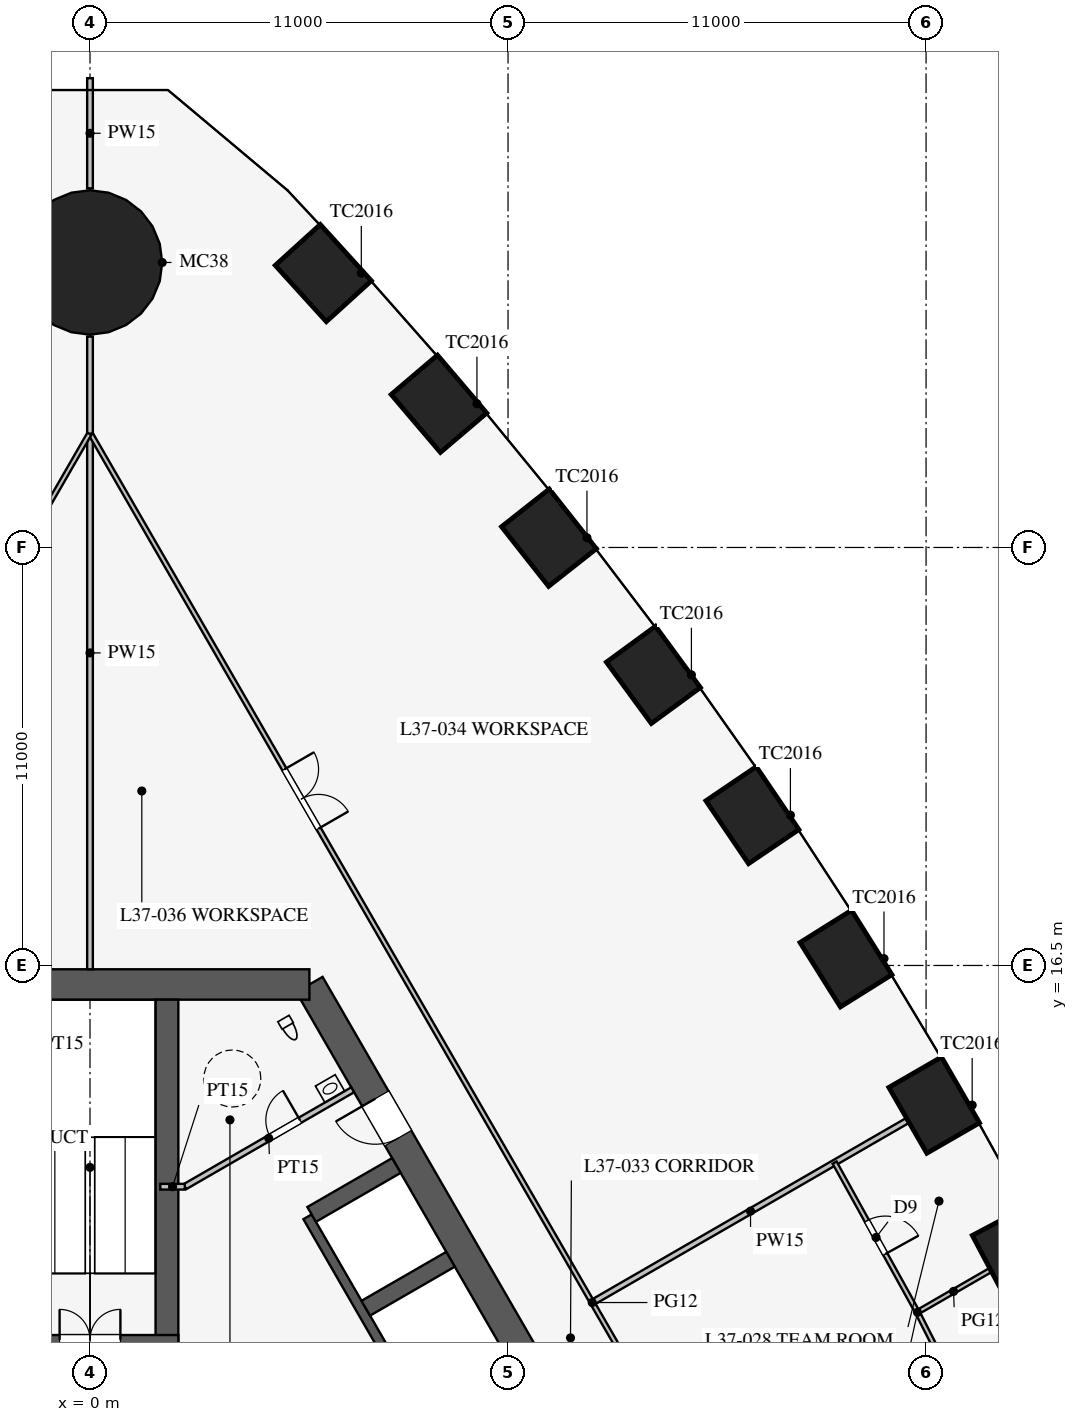
"""IFC4 building model, lengths in metres.
Left out: names, types, materials, properties, quantities, classifications, styles, units other than length and angle.
Written with IfcOpenShell. Run it as: python <this file> out.ifc"""

import sys

from ifc_helpers import new_model, si_unit, direction, frame, frame_2d, origin, origin_2d, place, context, subcontext, project, spatial, rectangle, circle, extrude, element, fill, save


model = new_model("IFC4")
c1 = context("Model", 3, precision=1e-05, world=origin(), true_north=direction((0.0, 1.0)))
c2 = subcontext(c1, "Body", "Model", "MODEL_VIEW")
j1 = project(units=[si_unit("LENGTHUNIT", "METRE"), si_unit("PLANEANGLEUNIT", "RADIAN")], contexts=[c1])
p1 = place(None, origin())
s1 = spatial("IfcSite", under=j1, at=p1, CompositionType="ELEMENT")
p2 = place(p1, origin())
s2 = spatial("IfcBuilding", under=s1, at=p2, CompositionType="ELEMENT")
p3 = place(p2, frame((0.0, 0.0, 161.9)))
s3 = spatial("IfcBuildingStorey", under=s2, at=p3, CompositionType="ELEMENT", Elevation=161.9)
for number, where, z_axis, x_axis in (
    (1, (24.393, 8.887, 0.0), (0.0, 0.0, 1.0), (-0.468, 0.883, 0.0)),
    (2, (22.213, 12.825, 0.0), (0.0, 0.0, 1.0), (-0.5, 0.866, 0.0)),
    (3, (19.893, 16.681, 0.0), (0.0, 0.0, 1.0), (-0.531, 0.847, 0.0)),
    (4, (17.43, 20.456, 0.0), (0.0, 0.0, 1.0), (-0.561, 0.828, 0.0)),
    (5, (14.825, 24.148, 0.0), (0.0, 0.0, 1.0), (-0.591, 0.807, 0.0)),
    (6, (12.077, 27.757, 0.0), (0.0, 0.0, 1.0), (-0.62, 0.785, 0.0)),
    (7, (9.182, 31.282, 0.0), (0.0, 0.0, 1.0), (-0.648, 0.762, 0.0)),
    (8, (6.139, 34.721, 0.0), (0.0, 0.0, 1.0), (-0.672, 0.74, 0.0)),
):
    element("IfcColumn", number, at=place(p3, frame(where, z_axis=z_axis, x_axis=x_axis)), inside=s3, PredefinedType="COLUMN", context=c2, shape_type="SweptSolid", body=[
        extrude(rectangle(XDim=2.0, YDim=1.6, at=origin_2d()), origin(), (0.0, 0.0, 1.0), 4.2),
    ])
p4 = place(p3, frame((0.0, 35.0, 0.0), z_axis=(0.0, 0.0, 1.0), x_axis=(1.0, 0.0, 0.0)))
e9 = element("IfcColumn", 9, at=p4, inside=s3, PredefinedType="COLUMN", context=c2, shape_type="SweptSolid", body=[
    extrude(circle(Radius=1.9, at=origin_2d()), origin(), (0.0, 0.0, 1.0), 4.2),
])
p5 = place(p3, frame((16.743, -3.0, 0.0), z_axis=(0.0, 0.0, 1.0), x_axis=(-0.500002442456, 0.866023993627, 0.0)))
e10 = element("IfcWall", 10, at=p5, inside=s3, PredefinedType="SHEAR", context=c2, shape_type="SweptSolid", body=[
    extrude(rectangle(XDim=21.939, YDim=0.8, at=frame_2d((10.97, 0.0))), origin(), (0.0, 0.0, 1.0), 4.2),
])
p6 = place(p5, frame((17.27, 0.0, 0.0)))
e11 = element("IfcOpeningElement", 11, at=p6, cuts=e10, PredefinedType="OPENING", context=c2, shape_type="SweptSolid", body=[
    extrude(rectangle(XDim=1.2, YDim=2.1, at=frame_2d((0.6, 1.05))), frame((0.0, 0.41, 0.0), z_axis=(0.0, -1.0, 0.0), x_axis=(1.0, 0.0, 0.0)), (0.0, 0.0, 1.0), 0.82),
])
p7 = place(p5, frame((3.47, 0.0, 0.0)))
e12 = element("IfcOpeningElement", 12, at=p7, cuts=e10, PredefinedType="OPENING", context=c2, shape_type="SweptSolid", body=[
    extrude(rectangle(XDim=1.2, YDim=2.1, at=frame_2d((0.6, 1.05))), frame((0.0, 0.41, 0.0), z_axis=(0.0, -1.0, 0.0), x_axis=(1.0, 0.0, 0.0)), (0.0, 0.0, 1.0), 0.82),
])
p8 = place(p3, frame((5.773, 16.0, 0.0), z_axis=(0.0, 0.0, 1.0), x_axis=(-1.0, 0.0, 0.0)))
e13 = element("IfcWall", 13, at=p8, inside=s3, PredefinedType="SHEAR", context=c2, shape_type="SweptSolid", body=[
    extrude(rectangle(XDim=11.547, YDim=0.8, at=frame_2d((5.773, 0.0))), origin(), (0.0, 0.0, 1.0), 4.2),
])
p9 = place(p3, frame((11.424, 0.014, 0.0), z_axis=(0.0, 0.0, 1.0), x_axis=(-0.500001763848, 0.866024385424, 0.0)))
e14 = element("IfcWall", 14, at=p9, inside=s3, PredefinedType="SHEAR", context=c2, shape_type="SweptSolid", body=[
    extrude(rectangle(XDim=11.4, YDim=0.25, at=frame_2d((5.7, 0.0))), origin(), (0.0, 0.0, 1.0), 4.2),
])
p10 = place(p9, frame((0.975, 0.0, 0.0)))
e15 = element("IfcOpeningElement", 15, at=p10, cuts=e14, PredefinedType="OPENING", context=c2, shape_type="SweptSolid", body=[
    extrude(rectangle(XDim=0.9, YDim=2.1, at=frame_2d((0.45, 1.05))), frame((0.0, 0.135, 0.0), z_axis=(0.0, -1.0, 0.0), x_axis=(1.0, 0.0, 0.0)), (0.0, 0.0, 1.0), 0.27),
])
p11 = place(p9, frame((3.825, 0.0, 0.0)))
e16 = element("IfcOpeningElement", 16, at=p11, cuts=e14, PredefinedType="OPENING", context=c2, shape_type="SweptSolid", body=[
    extrude(rectangle(XDim=0.9, YDim=2.1, at=frame_2d((0.45, 1.05))), frame((0.0, 0.135, 0.0), z_axis=(0.0, -1.0, 0.0), x_axis=(1.0, 0.0, 0.0)), (0.0, 0.0, 1.0), 0.27),
])
p12 = place(p3, frame((7.257, 7.481, 0.0), z_axis=(0.0, 0.0, 1.0), x_axis=(0.866046643894, 0.499963209246, 0.0)))
e17 = element("IfcWall", 17, at=p12, inside=s3, PredefinedType="SHEAR", context=c2, shape_type="SweptSolid", body=[
    extrude(rectangle(XDim=2.575, YDim=0.45, at=frame_2d((1.288, 0.0))), origin(), (0.0, 0.0, 1.0), 4.2),
])
p13 = place(p3, frame((5.832, 9.949, 0.0), z_axis=(0.0, 0.0, 1.0), x_axis=(0.866029291668, 0.499993265928, 0.0)))
e18 = element("IfcWall", 18, at=p13, inside=s3, PredefinedType="SHEAR", context=c2, shape_type="SweptSolid", body=[
    extrude(rectangle(XDim=2.575, YDim=0.45, at=frame_2d((1.288, 0.0))), origin(), (0.0, 0.0, 1.0), 4.2),
])
p14 = place(p3, frame((2.025, 6.525, 0.0), z_axis=(0.0, 0.0, 1.0), x_axis=(0.0, 1.0, 0.0)))
e19 = element("IfcWall", 19, at=p14, inside=s3, PredefinedType="SHEAR", context=c2, shape_type="SweptSolid", body=[
    extrude(rectangle(XDim=9.075, YDim=0.6, at=frame_2d((4.538, 0.0))), origin(), (0.0, 0.0, 1.0), 4.2),
])
p15 = place(p3, frame((2.325, 6.65, 0.0), z_axis=(0.0, 0.0, 1.0), x_axis=(-1.0, 0.0, 0.0)))
e20 = element("IfcWall", 20, at=p15, inside=s3, PredefinedType="SHEAR", context=c2, shape_type="SweptSolid", body=[
    extrude(rectangle(XDim=4.65, YDim=0.25, at=frame_2d((2.325, 0.0))), origin(), (0.0, 0.0, 1.0), 4.2),
])
p16 = place(p15, frame((1.525, 0.0, 0.0)))
e21 = element("IfcOpeningElement", 21, at=p16, cuts=e20, PredefinedType="OPENING", context=c2, shape_type="SweptSolid", body=[
    extrude(rectangle(XDim=1.6, YDim=2.1, at=frame_2d((0.8, 1.05))), frame((0.0, 0.135, 0.0), z_axis=(0.0, -1.0, 0.0), x_axis=(1.0, 0.0, 0.0)), (0.0, 0.0, 1.0), 0.27),
])
p17 = place(p3, frame((2.495, 10.678, 0.0), z_axis=(0.0, 0.0, 1.0), x_axis=(0.86602216432, 0.500005610874, 0.0)))
e22 = element("IfcWall", 22, at=p17, inside=s3, PredefinedType="PARTITIONING", context=c2, shape_type="SweptSolid", body=[
    extrude(rectangle(XDim=5.1, YDim=0.15, at=frame_2d((2.55, 0.0))), origin(), (0.0, 0.0, 1.0), 4.0),
])
p18 = place(p17, frame((2.6, 0.0, 0.0)))
e23 = element("IfcOpeningElement", 23, at=p18, cuts=e22, PredefinedType="OPENING", context=c2, shape_type="SweptSolid", body=[
    extrude(rectangle(XDim=0.9, YDim=2.1, at=frame_2d((0.45, 1.05))), frame((0.0, 0.085, 0.0), z_axis=(0.0, -1.0, 0.0), x_axis=(1.0, 0.0, 0.0)), (0.0, 0.0, 1.0), 0.17),
])
p19 = place(p3, frame((2.495, 10.678, 0.0), z_axis=(0.0, 0.0, 1.0), x_axis=(-1.0, 0.0, 0.0)))
e24 = element("IfcWall", 24, at=p19, inside=s3, PredefinedType="PARTITIONING", context=c2, shape_type="SweptSolid", body=[
    extrude(rectangle(XDim=0.645, YDim=0.15, at=frame_2d((0.323, 0.0))), origin(), (0.0, 0.0, 1.0), 4.0),
])
p20 = place(p3, frame((0.0, 16.4, 0.0), z_axis=(0.0, 0.0, 1.0), x_axis=(0.0, 1.0, 0.0)))
e25 = element("IfcWall", 25, at=p20, inside=s3, PredefinedType="PARTITIONING", context=c2, shape_type="SweptSolid", body=[
    extrude(rectangle(XDim=16.65, YDim=0.15, at=frame_2d((8.325, 0.0))), origin(), (0.0, 0.0, 1.0), 2.3),
])
p21 = place(p3, frame((0.0, 36.95, 0.0), z_axis=(0.0, 0.0, 1.0), x_axis=(0.0, 1.0, 0.0)))
e26 = element("IfcWall", 26, at=p21, inside=s3, PredefinedType="PARTITIONING", context=c2, shape_type="SweptSolid", body=[
    extrude(rectangle(XDim=2.899, YDim=0.15, at=frame_2d((1.45, 0.0))), origin(), (0.0, 0.0, 1.0), 2.3),
])
p22 = place(p3, frame((13.268, 7.66, 0.0), z_axis=(0.0, 0.0, 1.0), x_axis=(0.866013963754, 0.500019814191, 0.0)))
e27 = element("IfcWall", 27, at=p22, inside=s3, PredefinedType="PARTITIONING", context=c2, shape_type="SweptSolid", body=[
    extrude(rectangle(XDim=9.5, YDim=0.15, at=frame_2d((4.75, 0.0))), origin(), (0.0, 0.0, 1.0), 2.8),
])
p23 = place(p3, frame((26.415, -15.231, 0.0), z_axis=(0.0, 0.0, 1.0), x_axis=(-0.50000091641, 0.866024874695, 0.0)))
e28 = element("IfcWall", 28, at=p23, inside=s3, PredefinedType="PARTITIONING", context=c2, shape_type="SweptSolid", body=[
    extrude(rectangle(XDim=52.796, YDim=0.12, at=frame_2d((26.398, 0.0))), origin(), (0.0, 0.0, 1.0), 2.9),
])
p24 = place(p23, frame((10.2, 0.0, 0.15)))
e29 = element("IfcOpeningElement", 29, at=p24, cuts=e28, PredefinedType="OPENING", context=c2, shape_type="SweptSolid", body=[
    extrude(rectangle(XDim=1.8, YDim=2.1, at=frame_2d((0.9, 1.05))), frame((0.0, 0.07, 0.0), z_axis=(0.0, -1.0, 0.0), x_axis=(1.0, 0.0, 0.0)), (0.0, 0.0, 1.0), 0.14),
])
p25 = place(p23, frame((40.8, 0.0, 0.15)))
e30 = element("IfcOpeningElement", 30, at=p25, cuts=e28, PredefinedType="OPENING", context=c2, shape_type="SweptSolid", body=[
    extrude(rectangle(XDim=1.8, YDim=2.1, at=frame_2d((0.9, 1.05))), frame((0.0, 0.07, 0.0), z_axis=(0.0, -1.0, 0.0), x_axis=(1.0, 0.0, 0.0)), (0.0, 0.0, 1.0), 0.14),
])
p26 = place(p3, frame((21.773, 7.375, 0.0), z_axis=(0.0, 0.0, 1.0), x_axis=(-0.484315883017, 0.87489320803, 0.0)))
e31 = element("IfcWall", 31, at=p26, inside=s3, PredefinedType="PARTITIONING", context=c2, shape_type="SweptSolid", body=[
    extrude(rectangle(XDim=4.5, YDim=0.12, at=frame_2d((2.25, 0.0))), origin(), (0.0, 0.0, 1.0), 2.9),
])
p27 = place(p26, frame((1.75, 0.0, 0.15)))
e32 = element("IfcOpeningElement", 32, at=p27, cuts=e31, PredefinedType="OPENING", context=c2, shape_type="SweptSolid", body=[
    extrude(rectangle(XDim=1.0, YDim=2.1, at=frame_2d((0.5, 1.05))), frame((0.0, 0.07, 0.0), z_axis=(0.0, -1.0, 0.0), x_axis=(1.0, 0.0, 0.0)), (0.0, 0.0, 1.0), 0.14),
])
p28 = place(p3, frame((23.812, 3.356, 0.0), z_axis=(0.0, 0.0, 1.0), x_axis=(-0.452449820092, 0.891789863308, 0.0)))
e33 = element("IfcWall", 33, at=p28, inside=s3, PredefinedType="PARTITIONING", context=c2, shape_type="SweptSolid", body=[
    extrude(rectangle(XDim=4.507, YDim=0.12, at=frame_2d((2.253, 0.0))), origin(), (0.0, 0.0, 1.0), 2.9),
])
p29 = place(p28, frame((1.75, 0.0, 0.15)))
e34 = element("IfcOpeningElement", 34, at=p29, cuts=e33, PredefinedType="OPENING", context=c2, shape_type="SweptSolid", body=[
    extrude(rectangle(XDim=1.0, YDim=2.1, at=frame_2d((0.5, 1.05))), frame((0.0, 0.07, 0.0), z_axis=(0.0, -1.0, 0.0), x_axis=(1.0, 0.0, 0.0)), (0.0, 0.0, 1.0), 0.14),
])
p30 = place(p3, frame((21.773, 7.375, 0.0), z_axis=(0.0, 0.0, 1.0), x_axis=(0.866050320478, 0.499956840538, 0.0)))
e35 = element("IfcWall", 35, at=p30, inside=s3, PredefinedType="PARTITIONING", context=c2, shape_type="SweptSolid", body=[
    extrude(rectangle(XDim=2.194, YDim=0.12, at=frame_2d((1.097, 0.0))), origin(), (0.0, 0.0, 1.0), 2.8),
])
p31 = place(p3, frame((-0.016, 30.491, 0.0), z_axis=(0.0, 0.0, 1.0), x_axis=(-0.50000091641, -0.866024874695, 0.0)))
e36 = element("IfcWall", 36, at=p31, inside=s3, PredefinedType="PARTITIONING", context=c2, shape_type="SweptSolid", body=[
    extrude(rectangle(XDim=52.796, YDim=0.12, at=frame_2d((26.398, 0.0))), origin(), (0.0, 0.0, 1.0), 2.9),
])
p32 = place(p31, frame((10.2, 0.0, 0.15)))
e37 = element("IfcOpeningElement", 37, at=p32, cuts=e36, PredefinedType="OPENING", context=c2, shape_type="SweptSolid", body=[
    extrude(rectangle(XDim=1.8, YDim=2.1, at=frame_2d((0.9, 1.05))), frame((0.0, 0.07, 0.0), z_axis=(0.0, -1.0, 0.0), x_axis=(1.0, 0.0, 0.0)), (0.0, 0.0, 1.0), 0.14),
])
p33 = place(p31, frame((40.8, 0.0, 0.15)))
e38 = element("IfcOpeningElement", 38, at=p33, cuts=e36, PredefinedType="OPENING", context=c2, shape_type="SweptSolid", body=[
    extrude(rectangle(XDim=1.8, YDim=2.1, at=frame_2d((0.9, 1.05))), frame((0.0, 0.07, 0.0), z_axis=(0.0, -1.0, 0.0), x_axis=(1.0, 0.0, 0.0)), (0.0, 0.0, 1.0), 0.14),
])
p34 = place(p18, origin())
e39 = element("IfcDoor", 39, at=p34, inside=s3, OperationType="SINGLE_SWING_RIGHT", PredefinedType="DOOR", context=c2, shape_type="SweptSolid", body=[
    extrude(rectangle(XDim=0.9, YDim=2.1, at=frame_2d((0.45, 1.05))), frame((0.0, 0.025, 0.0), z_axis=(0.0, -1.0, 0.0), x_axis=(1.0, 0.0, 0.0)), (0.0, 0.0, 1.0), 0.05),
])
fill(e23, e39)
p35 = place(p16, frame((1.6, 0.0, 0.0), z_axis=(0.0, 0.0, 1.0), x_axis=(-1.0, 0.0, 0.0)))
e40 = element("IfcDoor", 40, at=p35, inside=s3, OperationType="DOUBLE_DOOR_SINGLE_SWING", PredefinedType="DOOR", context=c2, shape_type="SweptSolid", body=[
    extrude(rectangle(XDim=1.6, YDim=2.1, at=frame_2d((0.8, 1.05))), frame((0.0, 0.025, 0.0), z_axis=(0.0, -1.0, 0.0), x_axis=(1.0, 0.0, 0.0)), (0.0, 0.0, 1.0), 0.05),
])
fill(e21, e40)
p36 = place(p6, origin())
e41 = element("IfcDoor", 41, at=p36, inside=s3, OperationType="SINGLE_SWING_RIGHT", PredefinedType="DOOR", context=c2, shape_type="SweptSolid", body=[
    extrude(rectangle(XDim=1.2, YDim=2.1, at=frame_2d((0.6, 1.05))), frame((0.0, 0.025, 0.0), z_axis=(0.0, -1.0, 0.0), x_axis=(1.0, 0.0, 0.0)), (0.0, 0.0, 1.0), 0.05),
])
fill(e11, e41)
p37 = place(p27, frame((1.0, 0.0, 0.0), z_axis=(0.0, 0.0, 1.0), x_axis=(-1.0, 0.0, 0.0)))
e42 = element("IfcDoor", 42, at=p37, inside=s3, OperationType="SINGLE_SWING_RIGHT", PredefinedType="DOOR", context=c2, shape_type="SweptSolid", body=[
    extrude(rectangle(XDim=1.0, YDim=2.1, at=frame_2d((0.5, 1.05))), frame((0.0, 0.025, 0.0), z_axis=(0.0, -1.0, 0.0), x_axis=(1.0, 0.0, 0.0)), (0.0, 0.0, 1.0), 0.05),
])
fill(e32, e42)
p38 = place(p25, frame((1.8, 0.0, 0.0), z_axis=(0.0, 0.0, 1.0), x_axis=(-1.0, 0.0, 0.0)))
e43 = element("IfcDoor", 43, at=p38, inside=s3, OperationType="DOUBLE_DOOR_SINGLE_SWING", PredefinedType="DOOR", context=c2, shape_type="SweptSolid", body=[
    extrude(rectangle(XDim=1.8, YDim=2.1, at=frame_2d((0.9, 1.05))), frame((0.0, 0.025, 0.0), z_axis=(0.0, -1.0, 0.0), x_axis=(1.0, 0.0, 0.0)), (0.0, 0.0, 1.0), 0.05),
])
fill(e30, e43)
save(model, sys.argv[1])
